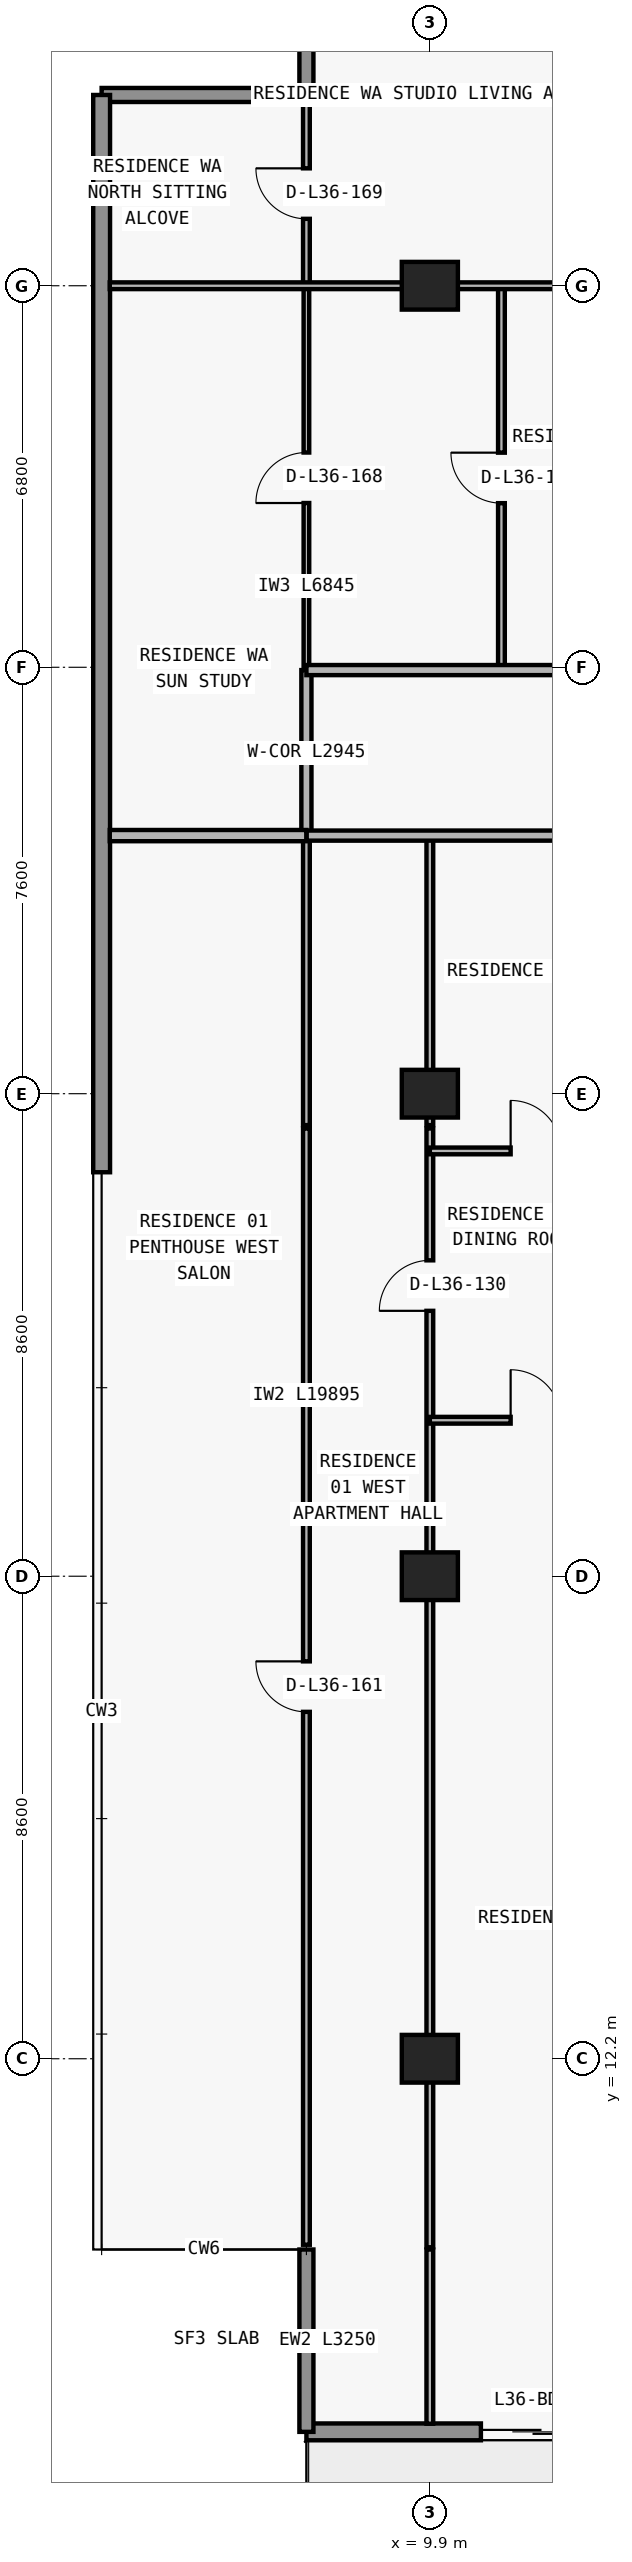
"""IFC4 building model, lengths in metres.
Left out: names, types, materials, properties, quantities, classifications, styles, units other than length and angle.
Written with IfcOpenShell. Run it as: python <this file> out.ifc"""

import sys

from ifc_helpers import new_model, si_unit, direction, frame, frame_2d, origin, origin_2d, place, context, subcontext, project, spatial, rectangle, extrude, element, fill, save


model = new_model("IFC4")
c1 = context("Model", 3, precision=1e-05, world=origin(), true_north=direction((0.0, 1.0)))
c2 = subcontext(c1, "Body", "Model", "MODEL_VIEW")
j1 = project(units=[si_unit("LENGTHUNIT", "METRE"), si_unit("PLANEANGLEUNIT", "RADIAN")], contexts=[c1])
p1 = place(None, origin())
s1 = spatial("IfcSite", under=j1, at=p1, CompositionType="ELEMENT")
p2 = place(p1, origin())
s2 = spatial("IfcBuilding", under=s1, at=p2, CompositionType="ELEMENT")
p3 = place(p2, frame((0.0, 0.0, 132.3)))
s3 = spatial("IfcBuildingStorey", under=s2, at=p3, CompositionType="ELEMENT", Elevation=132.3)
for number, where, z_axis, x_axis in (
    (1, (9.9, 12.2, 0.0), (0.0, 0.0, 1.0), (1.0, 0.0, 0.0)),
    (2, (9.9, 20.8, 0.0), (0.0, 0.0, 1.0), (1.0, 0.0, 0.0)),
    (3, (9.9, 29.4, 0.0), (0.0, 0.0, 1.0), (1.0, 0.0, 0.0)),
    (4, (9.9, 43.8, 0.0), (0.0, 0.0, 1.0), (1.0, 0.0, 0.0)),
):
    element("IfcColumn", number, at=place(p3, frame(where, z_axis=z_axis, x_axis=x_axis)), inside=s3, PredefinedType="COLUMN", context=c2, shape_type="SweptSolid", body=[
        extrude(rectangle(XDim=1.0, YDim=0.85, at=origin_2d()), origin(), (0.0, 0.0, 1.0), 3.05),
    ])
p4 = place(p3, frame((70.1, 5.55, 0.0), z_axis=(0.0, 0.0, 1.0), x_axis=(-1.0, 0.0, 0.0)))
e5 = element("IfcWall", 5, at=p4, inside=s3, PredefinedType="STANDARD", context=c2, shape_type="SweptSolid", body=[
    extrude(rectangle(XDim=62.4, YDim=0.3, at=frame_2d((31.2, 0.0))), origin(), (0.0, 0.0, 1.0), 3.05),
])
p5 = place(p4, frame((57.29, 0.0, 0.0)))
e6 = element("IfcOpeningElement", 6, at=p5, cuts=e5, PredefinedType="OPENING", context=c2, shape_type="SweptSolid", body=[
    extrude(rectangle(XDim=2.0, YDim=2.3, at=frame_2d((1.0, 1.15))), frame((0.0, 0.16, 0.0), z_axis=(0.0, -1.0, 0.0), x_axis=(1.0, 0.0, 0.0)), (0.0, 0.0, 1.0), 0.32),
])
p6 = place(p4, frame((52.61, 0.0, 0.65)))
e7 = element("IfcOpeningElement", 7, at=p6, cuts=e5, PredefinedType="OPENING", context=c2, shape_type="SweptSolid", body=[
    extrude(rectangle(XDim=2.6, YDim=1.85, at=frame_2d((1.3, 0.925))), frame((0.0, 0.16, 0.0), z_axis=(0.0, -1.0, 0.0), x_axis=(1.0, 0.0, 0.0)), (0.0, 0.0, 1.0), 0.32),
])
p7 = place(p4, frame((46.5, 0.0, 0.85)))
e8 = element("IfcOpeningElement", 8, at=p7, cuts=e5, PredefinedType="OPENING", context=c2, shape_type="SweptSolid", body=[
    extrude(rectangle(XDim=2.2, YDim=1.55, at=frame_2d((1.1, 0.775))), frame((0.0, 0.16, 0.0), z_axis=(0.0, -1.0, 0.0), x_axis=(1.0, 0.0, 0.0)), (0.0, 0.0, 1.0), 0.32),
])
p8 = place(p4, frame((40.49, 0.0, 0.0)))
e9 = element("IfcOpeningElement", 9, at=p8, cuts=e5, PredefinedType="OPENING", context=c2, shape_type="SweptSolid", body=[
    extrude(rectangle(XDim=2.0, YDim=2.3, at=frame_2d((1.0, 1.15))), frame((0.0, 0.16, 0.0), z_axis=(0.0, -1.0, 0.0), x_axis=(1.0, 0.0, 0.0)), (0.0, 0.0, 1.0), 0.32),
])
p9 = place(p4, frame((35.81, 0.0, 0.65)))
e10 = element("IfcOpeningElement", 10, at=p9, cuts=e5, PredefinedType="OPENING", context=c2, shape_type="SweptSolid", body=[
    extrude(rectangle(XDim=2.6, YDim=1.85, at=frame_2d((1.3, 0.925))), frame((0.0, 0.16, 0.0), z_axis=(0.0, -1.0, 0.0), x_axis=(1.0, 0.0, 0.0)), (0.0, 0.0, 1.0), 0.32),
])
p10 = place(p4, frame((30.1, 0.0, 0.85)))
e11 = element("IfcOpeningElement", 11, at=p10, cuts=e5, PredefinedType="OPENING", context=c2, shape_type="SweptSolid", body=[
    extrude(rectangle(XDim=2.2, YDim=1.55, at=frame_2d((1.1, 0.775))), frame((0.0, 0.16, 0.0), z_axis=(0.0, -1.0, 0.0), x_axis=(1.0, 0.0, 0.0)), (0.0, 0.0, 1.0), 0.32),
])
p11 = place(p4, frame((22.1, 0.0, 0.85)))
e12 = element("IfcOpeningElement", 12, at=p11, cuts=e5, PredefinedType="OPENING", context=c2, shape_type="SweptSolid", body=[
    extrude(rectangle(XDim=2.2, YDim=1.55, at=frame_2d((1.1, 0.775))), frame((0.0, 0.16, 0.0), z_axis=(0.0, -1.0, 0.0), x_axis=(1.0, 0.0, 0.0)), (0.0, 0.0, 1.0), 0.32),
])
p12 = place(p4, frame((16.026, 0.0, 0.0)))
e13 = element("IfcOpeningElement", 13, at=p12, cuts=e5, PredefinedType="OPENING", context=c2, shape_type="SweptSolid", body=[
    extrude(rectangle(XDim=2.0, YDim=2.3, at=frame_2d((1.0, 1.15))), frame((0.0, 0.16, 0.0), z_axis=(0.0, -1.0, 0.0), x_axis=(1.0, 0.0, 0.0)), (0.0, 0.0, 1.0), 0.32),
])
p13 = place(p4, frame((11.726, 0.0, 0.85)))
e14 = element("IfcOpeningElement", 14, at=p13, cuts=e5, PredefinedType="OPENING", context=c2, shape_type="SweptSolid", body=[
    extrude(rectangle(XDim=2.2, YDim=1.55, at=frame_2d((1.1, 0.775))), frame((0.0, 0.16, 0.0), z_axis=(0.0, -1.0, 0.0), x_axis=(1.0, 0.0, 0.0)), (0.0, 0.0, 1.0), 0.32),
])
p14 = place(p4, frame((7.29, 0.0, 0.0)))
e15 = element("IfcOpeningElement", 15, at=p14, cuts=e5, PredefinedType="OPENING", context=c2, shape_type="SweptSolid", body=[
    extrude(rectangle(XDim=2.0, YDim=2.3, at=frame_2d((1.0, 1.15))), frame((0.0, 0.16, 0.0), z_axis=(0.0, -1.0, 0.0), x_axis=(1.0, 0.0, 0.0)), (0.0, 0.0, 1.0), 0.32),
])
p15 = place(p4, frame((3.19, 0.0, 0.85)))
e16 = element("IfcOpeningElement", 16, at=p15, cuts=e5, PredefinedType="OPENING", context=c2, shape_type="SweptSolid", body=[
    extrude(rectangle(XDim=1.8, YDim=1.55, at=frame_2d((0.9, 0.775))), frame((0.0, 0.16, 0.0), z_axis=(0.0, -1.0, 0.0), x_axis=(1.0, 0.0, 0.0)), (0.0, 0.0, 1.0), 0.32),
])
p16 = place(p3, frame((7.7, 8.8, 0.0), z_axis=(0.0, 0.0, 1.0), x_axis=(0.0, -1.0, 0.0)))
e17 = element("IfcWall", 17, at=p16, inside=s3, PredefinedType="ELEMENTEDWALL", context=c2, shape_type="SweptSolid", body=[
    extrude(rectangle(XDim=3.25, YDim=0.25, at=frame_2d((1.625, 0.0))), origin(), (0.0, 0.0, 1.0), 3.05),
])
p17 = place(p3, frame((4.05, 47.2, 0.0), z_axis=(0.0, 0.0, 1.0), x_axis=(1.0, 0.0, 0.0)))
e18 = element("IfcWall", 18, at=p17, inside=s3, PredefinedType="ELEMENTEDWALL", context=c2, shape_type="SweptSolid", body=[
    extrude(rectangle(XDim=3.65, YDim=0.25, at=frame_2d((1.825, 0.0))), origin(), (0.0, 0.0, 1.0), 3.05),
])
p18 = place(p3, frame((7.7, 47.2, 0.0), z_axis=(0.0, 0.0, 1.0), x_axis=(0.0, 1.0, 0.0)))
e19 = element("IfcWall", 19, at=p18, inside=s3, PredefinedType="ELEMENTEDWALL", context=c2, shape_type="SweptSolid", body=[
    extrude(rectangle(XDim=3.25, YDim=0.25, at=frame_2d((1.625, 0.0))), origin(), (0.0, 0.0, 1.0), 3.05),
])
p19 = place(p3, frame((4.05, 28.0, 0.0), z_axis=(0.0, 0.0, 1.0), x_axis=(0.0, 1.0, 0.0)))
e20 = element("IfcWall", 20, at=p19, inside=s3, PredefinedType="STANDARD", context=c2, shape_type="SweptSolid", body=[
    extrude(rectangle(XDim=19.2, YDim=0.3, at=frame_2d((9.6, 0.0))), origin(), (0.0, 0.0, 1.0), 3.05),
])
p20 = place(p3, frame((7.7, 8.885, 0.0), z_axis=(0.0, 0.0, 1.0), x_axis=(0.0, 1.0, 0.0)))
e21 = element("IfcWall", 21, at=p20, inside=s3, PredefinedType="PARTITIONING", context=c2, shape_type="SweptSolid", body=[
    extrude(rectangle(XDim=19.895, YDim=0.12, at=frame_2d((9.948, 0.0))), origin(), (0.0, 0.0, 1.0), 3.05),
])
p21 = place(p20, frame((9.498, 0.0, 0.0)))
e22 = element("IfcOpeningElement", 22, at=p21, cuts=e21, PredefinedType="OPENING", context=c2, shape_type="SweptSolid", body=[
    extrude(rectangle(XDim=0.9, YDim=2.15, at=frame_2d((0.45, 1.075))), frame((0.0, 0.07, 0.0), z_axis=(0.0, -1.0, 0.0), x_axis=(1.0, 0.0, 0.0)), (0.0, 0.0, 1.0), 0.14),
])
p22 = place(p3, frame((7.7, 28.84, 0.0), z_axis=(0.0, 0.0, 1.0), x_axis=(0.0, 1.0, 0.0)))
e23 = element("IfcWall", 23, at=p22, inside=s3, PredefinedType="PARTITIONING", context=c2, shape_type="SweptSolid", body=[
    extrude(rectangle(XDim=5.16, YDim=0.12, at=frame_2d((2.58, 0.0))), origin(), (0.0, 0.0, 1.0), 3.05),
])
p23 = place(p3, frame((7.7, 34.005, 0.0), z_axis=(0.0, 0.0, 1.0), x_axis=(0.0, 1.0, 0.0)))
e24 = element("IfcWall", 24, at=p23, inside=s3, PredefinedType="PARTITIONING", context=c2, shape_type="SweptSolid", body=[
    extrude(rectangle(XDim=2.945, YDim=0.18, at=frame_2d((1.473, 0.0))), origin(), (0.0, 0.0, 1.0), 3.05),
])
p24 = place(p3, frame((7.7, 36.955, 0.0), z_axis=(0.0, 0.0, 1.0), x_axis=(0.0, 1.0, 0.0)))
e25 = element("IfcWall", 25, at=p24, inside=s3, PredefinedType="MOVABLE", context=c2, shape_type="SweptSolid", body=[
    extrude(rectangle(XDim=6.845, YDim=0.1, at=frame_2d((3.422, 0.0))), origin(), (0.0, 0.0, 1.0), 3.05),
])
p25 = place(p24, frame((2.972, 0.0, 0.0)))
e26 = element("IfcOpeningElement", 26, at=p25, cuts=e25, PredefinedType="OPENING", context=c2, shape_type="SweptSolid", body=[
    extrude(rectangle(XDim=0.9, YDim=2.15, at=frame_2d((0.45, 1.075))), frame((0.0, 0.06, 0.0), z_axis=(0.0, -1.0, 0.0), x_axis=(1.0, 0.0, 0.0)), (0.0, 0.0, 1.0), 0.12),
])
p26 = place(p3, frame((7.7, 43.805, 0.0), z_axis=(0.0, 0.0, 1.0), x_axis=(0.0, 1.0, 0.0)))
e27 = element("IfcWall", 27, at=p26, inside=s3, PredefinedType="PARTITIONING", context=c2, shape_type="SweptSolid", body=[
    extrude(rectangle(XDim=3.275, YDim=0.12, at=frame_2d((1.638, 0.0))), origin(), (0.0, 0.0, 1.0), 3.05),
])
p27 = place(p26, frame((1.188, 0.0, 0.0)))
e28 = element("IfcOpeningElement", 28, at=p27, cuts=e27, PredefinedType="OPENING", context=c2, shape_type="SweptSolid", body=[
    extrude(rectangle(XDim=0.9, YDim=2.15, at=frame_2d((0.45, 1.075))), frame((0.0, 0.07, 0.0), z_axis=(0.0, -1.0, 0.0), x_axis=(1.0, 0.0, 0.0)), (0.0, 0.0, 1.0), 0.14),
])
p28 = place(p3, frame((9.9, 5.695, 0.0), z_axis=(0.0, 0.0, 1.0), x_axis=(0.0, 1.0, 0.0)))
e29 = element("IfcWall", 29, at=p28, inside=s3, PredefinedType="PARTITIONING", context=c2, shape_type="SweptSolid", body=[
    extrude(rectangle(XDim=3.105, YDim=0.12, at=frame_2d((1.552, 0.0))), origin(), (0.0, 0.0, 1.0), 3.05),
])
p29 = place(p3, frame((9.9, 8.84, 0.0), z_axis=(0.0, 0.0, 1.0), x_axis=(0.0, 1.0, 0.0)))
e30 = element("IfcWall", 30, at=p29, inside=s3, PredefinedType="PARTITIONING", context=c2, shape_type="SweptSolid", body=[
    extrude(rectangle(XDim=19.94, YDim=0.12, at=frame_2d((9.97, 0.0))), origin(), (0.0, 0.0, 1.0), 2.174),
])
p30 = place(p29, frame((16.69, 0.0, 0.0)))
e31 = element("IfcOpeningElement", 31, at=p30, cuts=e30, PredefinedType="OPENING", context=c2, shape_type="SweptSolid", body=[
    extrude(rectangle(XDim=0.9, YDim=2.124, at=frame_2d((0.45, 1.062))), frame((0.0, 0.07, 0.0), z_axis=(0.0, -1.0, 0.0), x_axis=(1.0, 0.0, 0.0)), (0.0, 0.0, 1.0), 0.14),
])
p31 = place(p3, frame((9.9, 28.84, 0.0), z_axis=(0.0, 0.0, 1.0), x_axis=(0.0, 1.0, 0.0)))
e32 = element("IfcWall", 32, at=p31, inside=s3, PredefinedType="PARTITIONING", context=c2, shape_type="SweptSolid", body=[
    extrude(rectangle(XDim=5.16, YDim=0.12, at=frame_2d((2.58, 0.0))), origin(), (0.0, 0.0, 1.0), 2.174),
])
p32 = place(p3, frame((11.176, 36.95, 0.0), z_axis=(0.0, 0.0, 1.0), x_axis=(0.0, 1.0, 0.0)))
e33 = element("IfcWall", 33, at=p32, inside=s3, PredefinedType="PARTITIONING", context=c2, shape_type="SweptSolid", body=[
    extrude(rectangle(XDim=6.85, YDim=0.12, at=frame_2d((3.425, 0.0))), origin(), (0.0, 0.0, 1.0), 3.05),
])
p33 = place(p32, frame((2.975, 0.0, 0.0)))
e34 = element("IfcOpeningElement", 34, at=p33, cuts=e33, PredefinedType="OPENING", context=c2, shape_type="SweptSolid", body=[
    extrude(rectangle(XDim=0.9, YDim=2.15, at=frame_2d((0.45, 1.075))), frame((0.0, 0.07, 0.0), z_axis=(0.0, -1.0, 0.0), x_axis=(1.0, 0.0, 0.0)), (0.0, 0.0, 1.0), 0.14),
])
p34 = place(p3, frame((9.9, 23.58, 0.0), z_axis=(0.0, 0.0, 1.0), x_axis=(1.0, 0.0, 0.0)))
e35 = element("IfcWall", 35, at=p34, inside=s3, PredefinedType="PARTITIONING", context=c2, shape_type="SweptSolid", body=[
    extrude(rectangle(XDim=8.35, YDim=0.12, at=frame_2d((4.175, 0.0))), origin(), (0.0, 0.0, 1.0), 3.05),
])
p35 = place(p34, frame((1.44, 0.0, 0.0)))
e36 = element("IfcOpeningElement", 36, at=p35, cuts=e35, PredefinedType="OPENING", context=c2, shape_type="SweptSolid", body=[
    extrude(rectangle(XDim=0.9, YDim=2.15, at=frame_2d((0.45, 1.075))), frame((0.0, 0.07, 0.0), z_axis=(0.0, -1.0, 0.0), x_axis=(1.0, 0.0, 0.0)), (0.0, 0.0, 1.0), 0.14),
])
p36 = place(p3, frame((9.9, 28.38, 0.0), z_axis=(0.0, 0.0, 1.0), x_axis=(1.0, 0.0, 0.0)))
e37 = element("IfcWall", 37, at=p36, inside=s3, PredefinedType="PARTITIONING", context=c2, shape_type="SweptSolid", body=[
    extrude(rectangle(XDim=8.35, YDim=0.12, at=frame_2d((4.175, 0.0))), origin(), (0.0, 0.0, 1.0), 3.05),
])
p37 = place(p36, frame((1.44, 0.0, 0.0)))
e38 = element("IfcOpeningElement", 38, at=p37, cuts=e37, PredefinedType="OPENING", context=c2, shape_type="SweptSolid", body=[
    extrude(rectangle(XDim=0.9, YDim=2.15, at=frame_2d((0.45, 1.075))), frame((0.0, 0.07, 0.0), z_axis=(0.0, -1.0, 0.0), x_axis=(1.0, 0.0, 0.0)), (0.0, 0.0, 1.0), 0.14),
])
p38 = place(p3, frame((4.195, 34.0, 0.0), z_axis=(0.0, 0.0, 1.0), x_axis=(1.0, 0.0, 0.0)))
e39 = element("IfcWall", 39, at=p38, inside=s3, PredefinedType="PARTITIONING", context=c2, shape_type="SweptSolid", body=[
    extrude(rectangle(XDim=3.505, YDim=0.2, at=frame_2d((1.752, 0.0))), origin(), (0.0, 0.0, 1.0), 3.05),
])
p39 = place(p3, frame((7.705, 34.0, 0.0), z_axis=(0.0, 0.0, 1.0), x_axis=(1.0, 0.0, 0.0)))
e40 = element("IfcWall", 40, at=p39, inside=s3, PredefinedType="PARTITIONING", context=c2, shape_type="SweptSolid", body=[
    extrude(rectangle(XDim=10.545, YDim=0.18, at=frame_2d((5.272, 0.0))), origin(), (0.0, 0.0, 1.0), 3.05),
])
p40 = place(p39, frame((4.979, 0.0, 0.0)))
e41 = element("IfcOpeningElement", 41, at=p40, cuts=e40, PredefinedType="OPENING", context=c2, shape_type="SweptSolid", body=[
    extrude(rectangle(XDim=1.0, YDim=2.2, at=frame_2d((0.5, 1.1))), frame((0.0, 0.1, 0.0), z_axis=(0.0, -1.0, 0.0), x_axis=(1.0, 0.0, 0.0)), (0.0, 0.0, 1.0), 0.2),
])
p41 = place(p3, frame((7.7, 36.95, 0.0), z_axis=(0.0, 0.0, 1.0), x_axis=(1.0, 0.0, 0.0)))
e42 = element("IfcWall", 42, at=p41, inside=s3, PredefinedType="PARTITIONING", context=c2, shape_type="SweptSolid", body=[
    extrude(rectangle(XDim=10.145, YDim=0.18, at=frame_2d((5.073, 0.0))), origin(), (0.0, 0.0, 1.0), 3.05),
])
p42 = place(p41, frame((5.188, 0.0, 0.0)))
e43 = element("IfcOpeningElement", 43, at=p42, cuts=e42, PredefinedType="OPENING", context=c2, shape_type="SweptSolid", body=[
    extrude(rectangle(XDim=1.0, YDim=2.2, at=frame_2d((0.5, 1.1))), frame((0.0, 0.1, 0.0), z_axis=(0.0, -1.0, 0.0), x_axis=(1.0, 0.0, 0.0)), (0.0, 0.0, 1.0), 0.2),
])
p43 = place(p3, frame((4.195, 43.8, 0.0), z_axis=(0.0, 0.0, 1.0), x_axis=(1.0, 0.0, 0.0)))
e44 = element("IfcWall", 44, at=p43, inside=s3, PredefinedType="PARTITIONING", context=c2, shape_type="SweptSolid", body=[
    extrude(rectangle(XDim=13.66, YDim=0.12, at=frame_2d((6.83, 0.0))), origin(), (0.0, 0.0, 1.0), 2.339),
])
p44 = place(p43, frame((8.743, 0.0, 0.0)))
e45 = element("IfcOpeningElement", 45, at=p44, cuts=e44, PredefinedType="OPENING", context=c2, shape_type="SweptSolid", body=[
    extrude(rectangle(XDim=0.9, YDim=2.15, at=frame_2d((0.45, 1.075))), frame((0.0, 0.07, 0.0), z_axis=(0.0, -1.0, 0.0), x_axis=(1.0, 0.0, 0.0)), (0.0, 0.0, 1.0), 0.14),
])
p45 = place(p43, frame((12.107, 0.0, 0.0)))
e46 = element("IfcOpeningElement", 46, at=p45, cuts=e44, PredefinedType="OPENING", context=c2, shape_type="SweptSolid", body=[
    extrude(rectangle(XDim=0.85, YDim=2.1, at=frame_2d((0.425, 1.05))), frame((0.0, 0.07, 0.0), z_axis=(0.0, -1.0, 0.0), x_axis=(1.0, 0.0, 0.0)), (0.0, 0.0, 1.0), 0.14),
])
p46 = place(p5, origin())
e47 = element("IfcDoor", 47, at=p46, inside=s3, OperationType="DOUBLE_DOOR_SLIDING", PredefinedType="DOOR", context=c2, shape_type="SweptSolid", body=[
    extrude(rectangle(XDim=2.0, YDim=2.3, at=frame_2d((1.0, 1.15))), frame((0.0, 0.025, 0.0), z_axis=(0.0, -1.0, 0.0), x_axis=(1.0, 0.0, 0.0)), (0.0, 0.0, 1.0), 0.05),
])
fill(e6, e47)
p47 = place(p37, origin())
e48 = element("IfcDoor", 48, at=p47, inside=s3, OperationType="SINGLE_SWING_LEFT", PredefinedType="DOOR", context=c2, shape_type="SweptSolid", body=[
    extrude(rectangle(XDim=0.9, YDim=2.15, at=frame_2d((0.45, 1.075))), frame((0.0, 0.025, 0.0), z_axis=(0.0, -1.0, 0.0), x_axis=(1.0, 0.0, 0.0)), (0.0, 0.0, 1.0), 0.05),
])
fill(e38, e48)
p48 = place(p35, origin())
e49 = element("IfcDoor", 49, at=p48, inside=s3, OperationType="SINGLE_SWING_LEFT", PredefinedType="DOOR", context=c2, shape_type="SweptSolid", body=[
    extrude(rectangle(XDim=0.9, YDim=2.15, at=frame_2d((0.45, 1.075))), frame((0.0, 0.025, 0.0), z_axis=(0.0, -1.0, 0.0), x_axis=(1.0, 0.0, 0.0)), (0.0, 0.0, 1.0), 0.05),
])
fill(e36, e49)
p49 = place(p30, origin())
e50 = element("IfcDoor", 50, at=p49, inside=s3, OperationType="SINGLE_SWING_LEFT", PredefinedType="DOOR", context=c2, shape_type="SweptSolid", body=[
    extrude(rectangle(XDim=0.9, YDim=2.124, at=frame_2d((0.45, 1.062))), frame((0.0, 0.025, 0.0), z_axis=(0.0, -1.0, 0.0), x_axis=(1.0, 0.0, 0.0)), (0.0, 0.0, 1.0), 0.05),
])
fill(e31, e50)
p50 = place(p21, origin())
e51 = element("IfcDoor", 51, at=p50, inside=s3, OperationType="SINGLE_SWING_RIGHT", PredefinedType="DOOR", context=c2, shape_type="SweptSolid", body=[
    extrude(rectangle(XDim=0.9, YDim=2.15, at=frame_2d((0.45, 1.075))), frame((0.0, 0.025, 0.0), z_axis=(0.0, -1.0, 0.0), x_axis=(1.0, 0.0, 0.0)), (0.0, 0.0, 1.0), 0.05),
])
fill(e22, e51)
p51 = place(p33, origin())
e52 = element("IfcDoor", 52, at=p51, inside=s3, OperationType="SINGLE_SWING_RIGHT", PredefinedType="DOOR", context=c2, shape_type="SweptSolid", body=[
    extrude(rectangle(XDim=0.9, YDim=2.15, at=frame_2d((0.45, 1.075))), frame((0.0, 0.025, 0.0), z_axis=(0.0, -1.0, 0.0), x_axis=(1.0, 0.0, 0.0)), (0.0, 0.0, 1.0), 0.05),
])
fill(e34, e52)
p52 = place(p25, origin())
e53 = element("IfcDoor", 53, at=p52, inside=s3, OperationType="SINGLE_SWING_LEFT", PredefinedType="DOOR", context=c2, shape_type="SweptSolid", body=[
    extrude(rectangle(XDim=0.9, YDim=2.15, at=frame_2d((0.45, 1.075))), frame((0.0, 0.025, 0.0), z_axis=(0.0, -1.0, 0.0), x_axis=(1.0, 0.0, 0.0)), (0.0, 0.0, 1.0), 0.05),
])
fill(e26, e53)
p53 = place(p27, origin())
e54 = element("IfcDoor", 54, at=p53, inside=s3, OperationType="SINGLE_SWING_RIGHT", PredefinedType="DOOR", context=c2, shape_type="SweptSolid", body=[
    extrude(rectangle(XDim=0.9, YDim=2.15, at=frame_2d((0.45, 1.075))), frame((0.0, 0.025, 0.0), z_axis=(0.0, -1.0, 0.0), x_axis=(1.0, 0.0, 0.0)), (0.0, 0.0, 1.0), 0.05),
])
fill(e28, e54)
save(model, sys.argv[1])
